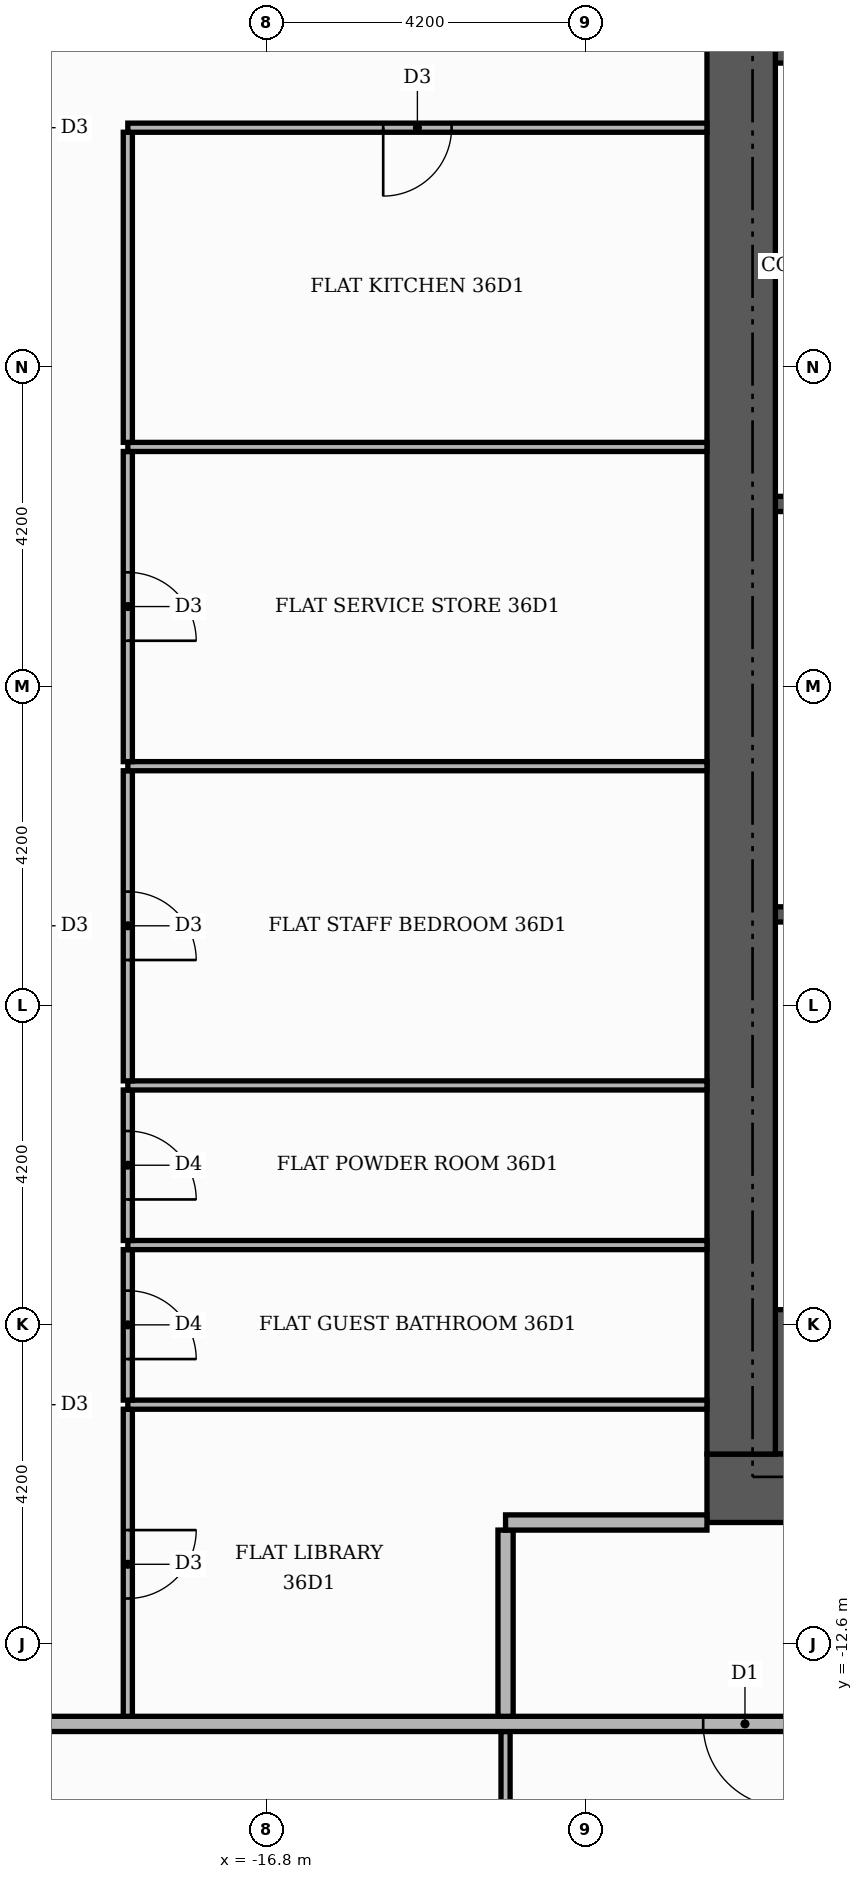
"""IFC4 building model, lengths in metres.
Left out: names, types, materials, properties, quantities, classifications, styles, units other than length and angle.
Written with IfcOpenShell. Run it as: python <this file> out.ifc"""

import sys

from ifc_helpers import new_model, si_unit, direction, frame, frame_2d, origin, place, context, subcontext, project, spatial, rectangle, extrude, element, fill, save


model = new_model("IFC4")
c1 = context("Model", 3, precision=1e-05, world=origin(), true_north=direction((0.0, 1.0)))
c2 = subcontext(c1, "Body", "Model", "MODEL_VIEW")
j1 = project(units=[si_unit("LENGTHUNIT", "METRE"), si_unit("PLANEANGLEUNIT", "RADIAN")], contexts=[c1])
p1 = place(None, origin())
s1 = spatial("IfcSite", under=j1, at=p1, CompositionType="ELEMENT")
p2 = place(p1, origin())
s2 = spatial("IfcBuilding", under=s1, at=p2, CompositionType="ELEMENT")
p3 = place(p2, frame((0.0, 0.0, 153.3)))
s3 = spatial("IfcBuildingStorey", under=s2, at=p3, CompositionType="ELEMENT", Elevation=153.3)
for number, where, z_axis, x_axis in (
    (1, (-10.1, -9.15, 0.0), (0.0, 0.0, 1.0), (1.0, 0.0, 0.0)),
    (2, (-10.1, 9.15, 0.0), (0.0, 0.0, 1.0), (1.0, 0.0, 0.0)),
):
    element("IfcWall", number, at=place(p3, frame(where, z_axis=z_axis, x_axis=x_axis)), inside=s3, PredefinedType="SHEAR", context=c2, shape_type="SweptSolid", body=[
        extrude(rectangle(XDim=4.6, YDim=1.9, at=frame_2d((2.3, 0.0))), origin(), (0.0, 0.0, 1.0), 3.48),
    ])
for number, where, z_axis, x_axis in (
    (3, (-10.1, -3.0, 0.0), (0.0, 0.0, 1.0), (1.0, 0.0, 0.0)),
    (4, (-10.1, 2.4, 0.0), (0.0, 0.0, 1.0), (1.0, 0.0, 0.0)),
):
    element("IfcWall", number, at=place(p3, frame(where, z_axis=z_axis, x_axis=x_axis)), inside=s3, PredefinedType="SHEAR", context=c2, shape_type="SweptSolid", body=[
        extrude(rectangle(XDim=0.9, YDim=0.2, at=frame_2d((0.45, 0.0))), origin(), (0.0, 0.0, 1.0), 3.48),
    ])
p4 = place(p3, frame((-11.0, -10.55, 0.0), z_axis=(0.0, 0.0, 1.0), x_axis=(1.0, 0.0, 0.0)))
e5 = element("IfcWall", 5, at=p4, inside=s3, PredefinedType="SHEAR", context=c2, shape_type="SweptSolid", body=[
    extrude(rectangle(XDim=22.0, YDim=0.9, at=frame_2d((11.0, 0.0))), origin(), (0.0, 0.0, 1.0), 3.48),
])
p5 = place(p4, frame((7.4, 0.0, 0.0)))
e6 = element("IfcOpeningElement", 6, at=p5, cuts=e5, PredefinedType="OPENING", context=c2, shape_type="SweptSolid", body=[
    extrude(rectangle(XDim=1.8, YDim=2.2, at=frame_2d((0.9, 1.1))), frame((0.0, 0.46, 0.0), z_axis=(0.0, -1.0, 0.0), x_axis=(1.0, 0.0, 0.0)), (0.0, 0.0, 1.0), 0.92),
])
p6 = place(p3, frame((-10.55, -10.1, 0.0), z_axis=(0.0, 0.0, 1.0), x_axis=(0.0, 1.0, 0.0)))
e7 = element("IfcWall", 7, at=p6, inside=s3, PredefinedType="SHEAR", context=c2, shape_type="SweptSolid", body=[
    extrude(rectangle(XDim=20.2, YDim=0.9, at=frame_2d((10.1, 0.0))), origin(), (0.0, 0.0, 1.0), 3.48),
])
p7 = place(p3, frame((-13.65, -20.66, 0.0), z_axis=(0.0, 0.0, 1.0), x_axis=(0.0, 1.0, 0.0)))
e8 = element("IfcWall", 8, at=p7, inside=s3, PredefinedType="PARTITIONING", context=c2, shape_type="SweptSolid", body=[
    extrude(rectangle(XDim=6.91, YDim=0.12, at=frame_2d((3.455, 0.0))), origin(), (0.0, 0.0, 1.0), 3.48),
])
p8 = place(p7, frame((3.025, 0.0, 0.0)))
e9 = element("IfcOpeningElement", 9, at=p8, cuts=e8, PredefinedType="OPENING", context=c2, shape_type="SweptSolid", body=[
    extrude(rectangle(XDim=0.9, YDim=2.1, at=frame_2d((0.45, 1.05))), frame((0.0, 0.07, 0.0), z_axis=(0.0, -1.0, 0.0), x_axis=(1.0, 0.0, 0.0)), (0.0, 0.0, 1.0), 0.14),
])
p9 = place(p3, frame((-25.42, -13.65, 0.0), z_axis=(0.0, 0.0, 1.0), x_axis=(1.0, 0.0, 0.0)))
e10 = element("IfcWall", 10, at=p9, inside=s3, PredefinedType="PARTITIONING", context=c2, shape_type="SweptSolid", body=[
    extrude(rectangle(XDim=39.07, YDim=0.2, at=frame_2d((19.535, 0.0))), origin(), (0.0, 0.0, 1.0), 3.48),
])
p10 = place(p9, frame((14.37, 0.0, 0.0)))
e11 = element("IfcOpeningElement", 11, at=p10, cuts=e10, PredefinedType="OPENING", context=c2, shape_type="SweptSolid", body=[
    extrude(rectangle(XDim=1.1, YDim=2.4, at=frame_2d((0.55, 1.2))), frame((0.0, 0.11, 0.0), z_axis=(0.0, -1.0, 0.0), x_axis=(1.0, 0.0, 0.0)), (0.0, 0.0, 1.0), 0.22),
])
p11 = place(p3, frame((-18.62, -13.55, 0.0), z_axis=(0.0, 0.0, 1.0), x_axis=(0.0, 1.0, 0.0)))
e12 = element("IfcWall", 12, at=p11, inside=s3, PredefinedType="PARTITIONING", context=c2, shape_type="SweptSolid", body=[
    extrude(rectangle(XDim=4.04, YDim=0.12, at=frame_2d((2.02, 0.0))), origin(), (0.0, 0.0, 1.0), 3.48),
])
p12 = place(p11, frame((1.55, 0.0, 0.0)))
e13 = element("IfcOpeningElement", 13, at=p12, cuts=e12, PredefinedType="OPENING", context=c2, shape_type="SweptSolid", body=[
    extrude(rectangle(XDim=0.9, YDim=2.1, at=frame_2d((0.45, 1.05))), frame((0.0, 0.07, 0.0), z_axis=(0.0, -1.0, 0.0), x_axis=(1.0, 0.0, 0.0)), (0.0, 0.0, 1.0), 0.14),
])
p13 = place(p3, frame((-13.65, -13.55, 0.0), z_axis=(0.0, 0.0, 1.0), x_axis=(0.0, 1.0, 0.0)))
e14 = element("IfcWall", 14, at=p13, inside=s3, PredefinedType="PARTITIONING", context=c2, shape_type="SweptSolid", body=[
    extrude(rectangle(XDim=2.45, YDim=0.2, at=frame_2d((1.225, 0.0))), origin(), (0.0, 0.0, 1.0), 3.48),
])
p14 = place(p3, frame((-13.65, -11.0, 0.0), z_axis=(0.0, 0.0, 1.0), x_axis=(1.0, 0.0, 0.0)))
e15 = element("IfcWall", 15, at=p14, inside=s3, PredefinedType="PARTITIONING", context=c2, shape_type="SweptSolid", body=[
    extrude(rectangle(XDim=2.65, YDim=0.2, at=frame_2d((1.325, 0.0))), origin(), (0.0, 0.0, 1.0), 3.48),
])
p15 = place(p3, frame((-18.62, -9.45, 0.0), z_axis=(0.0, 0.0, 1.0), x_axis=(1.0, 0.0, 0.0)))
e16 = element("IfcWall", 16, at=p15, inside=s3, PredefinedType="PARTITIONING", context=c2, shape_type="SweptSolid", body=[
    extrude(rectangle(XDim=7.62, YDim=0.12, at=frame_2d((3.81, 0.0))), origin(), (0.0, 0.0, 1.0), 3.48),
])
p16 = place(p3, frame((-18.62, -9.39, 0.0), z_axis=(0.0, 0.0, 1.0), x_axis=(0.0, 1.0, 0.0)))
e17 = element("IfcWall", 17, at=p16, inside=s3, PredefinedType="PARTITIONING", context=c2, shape_type="SweptSolid", body=[
    extrude(rectangle(XDim=1.98, YDim=0.12, at=frame_2d((0.99, 0.0))), origin(), (0.0, 0.0, 1.0), 3.48),
])
p17 = place(p16, frame((0.54, 0.0, 0.0)))
e18 = element("IfcOpeningElement", 18, at=p17, cuts=e17, PredefinedType="OPENING", context=c2, shape_type="SweptSolid", body=[
    extrude(rectangle(XDim=0.9, YDim=2.1, at=frame_2d((0.45, 1.05))), frame((0.0, 0.07, 0.0), z_axis=(0.0, -1.0, 0.0), x_axis=(1.0, 0.0, 0.0)), (0.0, 0.0, 1.0), 0.14),
])
p18 = place(p3, frame((-18.62, -7.35, 0.0), z_axis=(0.0, 0.0, 1.0), x_axis=(1.0, 0.0, 0.0)))
e19 = element("IfcWall", 19, at=p18, inside=s3, PredefinedType="PARTITIONING", context=c2, shape_type="SweptSolid", body=[
    extrude(rectangle(XDim=7.62, YDim=0.12, at=frame_2d((3.81, 0.0))), origin(), (0.0, 0.0, 1.0), 3.48),
])
p19 = place(p3, frame((-18.62, -7.29, 0.0), z_axis=(0.0, 0.0, 1.0), x_axis=(0.0, 1.0, 0.0)))
e20 = element("IfcWall", 20, at=p19, inside=s3, PredefinedType="PARTITIONING", context=c2, shape_type="SweptSolid", body=[
    extrude(rectangle(XDim=1.98, YDim=0.12, at=frame_2d((0.99, 0.0))), origin(), (0.0, 0.0, 1.0), 3.48),
])
p20 = place(p19, frame((0.54, 0.0, 0.0)))
e21 = element("IfcOpeningElement", 21, at=p20, cuts=e20, PredefinedType="OPENING", context=c2, shape_type="SweptSolid", body=[
    extrude(rectangle(XDim=0.9, YDim=2.1, at=frame_2d((0.45, 1.05))), frame((0.0, 0.07, 0.0), z_axis=(0.0, -1.0, 0.0), x_axis=(1.0, 0.0, 0.0)), (0.0, 0.0, 1.0), 0.14),
])
p21 = place(p3, frame((-18.62, -5.25, 0.0), z_axis=(0.0, 0.0, 1.0), x_axis=(1.0, 0.0, 0.0)))
e22 = element("IfcWall", 22, at=p21, inside=s3, PredefinedType="PARTITIONING", context=c2, shape_type="SweptSolid", body=[
    extrude(rectangle(XDim=7.62, YDim=0.12, at=frame_2d((3.81, 0.0))), origin(), (0.0, 0.0, 1.0), 3.48),
])
p22 = place(p3, frame((-18.62, -5.19, 0.0), z_axis=(0.0, 0.0, 1.0), x_axis=(0.0, 1.0, 0.0)))
e23 = element("IfcWall", 23, at=p22, inside=s3, PredefinedType="PARTITIONING", context=c2, shape_type="SweptSolid", body=[
    extrude(rectangle(XDim=4.08, YDim=0.12, at=frame_2d((2.04, 0.0))), origin(), (0.0, 0.0, 1.0), 3.48),
])
p23 = place(p22, frame((1.59, 0.0, 0.0)))
e24 = element("IfcOpeningElement", 24, at=p23, cuts=e23, PredefinedType="OPENING", context=c2, shape_type="SweptSolid", body=[
    extrude(rectangle(XDim=0.9, YDim=2.1, at=frame_2d((0.45, 1.05))), frame((0.0, 0.07, 0.0), z_axis=(0.0, -1.0, 0.0), x_axis=(1.0, 0.0, 0.0)), (0.0, 0.0, 1.0), 0.14),
])
p24 = place(p3, frame((-18.62, -1.05, 0.0), z_axis=(0.0, 0.0, 1.0), x_axis=(1.0, 0.0, 0.0)))
e25 = element("IfcWall", 25, at=p24, inside=s3, PredefinedType="PARTITIONING", context=c2, shape_type="SweptSolid", body=[
    extrude(rectangle(XDim=7.62, YDim=0.12, at=frame_2d((3.81, 0.0))), origin(), (0.0, 0.0, 1.0), 3.48),
])
p25 = place(p3, frame((-18.62, -0.99, 0.0), z_axis=(0.0, 0.0, 1.0), x_axis=(0.0, 1.0, 0.0)))
e26 = element("IfcWall", 26, at=p25, inside=s3, PredefinedType="PARTITIONING", context=c2, shape_type="SweptSolid", body=[
    extrude(rectangle(XDim=4.08, YDim=0.12, at=frame_2d((2.04, 0.0))), origin(), (0.0, 0.0, 1.0), 3.48),
])
p26 = place(p25, frame((1.59, 0.0, 0.0)))
e27 = element("IfcOpeningElement", 27, at=p26, cuts=e26, PredefinedType="OPENING", context=c2, shape_type="SweptSolid", body=[
    extrude(rectangle(XDim=0.9, YDim=2.1, at=frame_2d((0.45, 1.05))), frame((0.0, 0.07, 0.0), z_axis=(0.0, -1.0, 0.0), x_axis=(1.0, 0.0, 0.0)), (0.0, 0.0, 1.0), 0.14),
])
p27 = place(p3, frame((-18.62, 3.15, 0.0), z_axis=(0.0, 0.0, 1.0), x_axis=(1.0, 0.0, 0.0)))
e28 = element("IfcWall", 28, at=p27, inside=s3, PredefinedType="PARTITIONING", context=c2, shape_type="SweptSolid", body=[
    extrude(rectangle(XDim=7.62, YDim=0.12, at=frame_2d((3.81, 0.0))), origin(), (0.0, 0.0, 1.0), 3.48),
])
p28 = place(p3, frame((-18.62, 3.21, 0.0), z_axis=(0.0, 0.0, 1.0), x_axis=(0.0, 1.0, 0.0)))
e29 = element("IfcWall", 29, at=p28, inside=s3, PredefinedType="PARTITIONING", context=c2, shape_type="SweptSolid", body=[
    extrude(rectangle(XDim=4.08, YDim=0.12, at=frame_2d((2.04, 0.0))), origin(), (0.0, 0.0, 1.0), 3.48),
])
p29 = place(p3, frame((-18.62, 7.35, 0.0), z_axis=(0.0, 0.0, 1.0), x_axis=(1.0, 0.0, 0.0)))
e30 = element("IfcWall", 30, at=p29, inside=s3, PredefinedType="PARTITIONING", context=c2, shape_type="SweptSolid", body=[
    extrude(rectangle(XDim=7.62, YDim=0.12, at=frame_2d((3.81, 0.0))), origin(), (0.0, 0.0, 1.0), 3.48),
])
p30 = place(p29, frame((3.36, 0.0, 0.0)))
e31 = element("IfcOpeningElement", 31, at=p30, cuts=e30, PredefinedType="OPENING", context=c2, shape_type="SweptSolid", body=[
    extrude(rectangle(XDim=0.9, YDim=2.1, at=frame_2d((0.45, 1.05))), frame((0.0, 0.07, 0.0), z_axis=(0.0, -1.0, 0.0), x_axis=(1.0, 0.0, 0.0)), (0.0, 0.0, 1.0), 0.14),
])
p31 = place(p10, frame((1.1, 0.0, 0.0), z_axis=(0.0, 0.0, 1.0), x_axis=(-1.0, 0.0, 0.0)))
e32 = element("IfcDoor", 32, at=p31, inside=s3, OperationType="SINGLE_SWING_RIGHT", PredefinedType="DOOR", context=c2, shape_type="SweptSolid", body=[
    extrude(rectangle(XDim=1.1, YDim=2.4, at=frame_2d((0.55, 1.2))), frame((0.0, 0.025, 0.0), z_axis=(0.0, -1.0, 0.0), x_axis=(1.0, 0.0, 0.0)), (0.0, 0.0, 1.0), 0.05),
])
fill(e11, e32)
p32 = place(p30, frame((0.9, 0.0, 0.0), z_axis=(0.0, 0.0, 1.0), x_axis=(-1.0, 0.0, 0.0)))
e33 = element("IfcDoor", 33, at=p32, inside=s3, OperationType="SINGLE_SWING_LEFT", PredefinedType="DOOR", context=c2, shape_type="SweptSolid", body=[
    extrude(rectangle(XDim=0.9, YDim=2.1, at=frame_2d((0.45, 1.05))), frame((0.0, 0.025, 0.0), z_axis=(0.0, -1.0, 0.0), x_axis=(1.0, 0.0, 0.0)), (0.0, 0.0, 1.0), 0.05),
])
fill(e31, e33)
p33 = place(p26, frame((0.9, 0.0, 0.0), z_axis=(0.0, 0.0, 1.0), x_axis=(-1.0, 0.0, 0.0)))
e34 = element("IfcDoor", 34, at=p33, inside=s3, OperationType="SINGLE_SWING_LEFT", PredefinedType="DOOR", context=c2, shape_type="SweptSolid", body=[
    extrude(rectangle(XDim=0.9, YDim=2.1, at=frame_2d((0.45, 1.05))), frame((0.0, 0.025, 0.0), z_axis=(0.0, -1.0, 0.0), x_axis=(1.0, 0.0, 0.0)), (0.0, 0.0, 1.0), 0.05),
])
fill(e27, e34)
p34 = place(p23, frame((0.9, 0.0, 0.0), z_axis=(0.0, 0.0, 1.0), x_axis=(-1.0, 0.0, 0.0)))
e35 = element("IfcDoor", 35, at=p34, inside=s3, OperationType="SINGLE_SWING_LEFT", PredefinedType="DOOR", context=c2, shape_type="SweptSolid", body=[
    extrude(rectangle(XDim=0.9, YDim=2.1, at=frame_2d((0.45, 1.05))), frame((0.0, 0.025, 0.0), z_axis=(0.0, -1.0, 0.0), x_axis=(1.0, 0.0, 0.0)), (0.0, 0.0, 1.0), 0.05),
])
fill(e24, e35)
p35 = place(p20, frame((0.9, 0.0, 0.0), z_axis=(0.0, 0.0, 1.0), x_axis=(-1.0, 0.0, 0.0)))
e36 = element("IfcDoor", 36, at=p35, inside=s3, OperationType="SINGLE_SWING_LEFT", PredefinedType="DOOR", context=c2, shape_type="SweptSolid", body=[
    extrude(rectangle(XDim=0.9, YDim=2.1, at=frame_2d((0.45, 1.05))), frame((0.0, 0.025, 0.0), z_axis=(0.0, -1.0, 0.0), x_axis=(1.0, 0.0, 0.0)), (0.0, 0.0, 1.0), 0.05),
])
fill(e21, e36)
p36 = place(p17, frame((0.9, 0.0, 0.0), z_axis=(0.0, 0.0, 1.0), x_axis=(-1.0, 0.0, 0.0)))
e37 = element("IfcDoor", 37, at=p36, inside=s3, OperationType="SINGLE_SWING_LEFT", PredefinedType="DOOR", context=c2, shape_type="SweptSolid", body=[
    extrude(rectangle(XDim=0.9, YDim=2.1, at=frame_2d((0.45, 1.05))), frame((0.0, 0.025, 0.0), z_axis=(0.0, -1.0, 0.0), x_axis=(1.0, 0.0, 0.0)), (0.0, 0.0, 1.0), 0.05),
])
fill(e18, e37)
p37 = place(p12, frame((0.9, 0.0, 0.0), z_axis=(0.0, 0.0, 1.0), x_axis=(-1.0, 0.0, 0.0)))
e38 = element("IfcDoor", 38, at=p37, inside=s3, OperationType="SINGLE_SWING_RIGHT", PredefinedType="DOOR", context=c2, shape_type="SweptSolid", body=[
    extrude(rectangle(XDim=0.9, YDim=2.1, at=frame_2d((0.45, 1.05))), frame((0.0, 0.025, 0.0), z_axis=(0.0, -1.0, 0.0), x_axis=(1.0, 0.0, 0.0)), (0.0, 0.0, 1.0), 0.05),
])
fill(e13, e38)
save(model, sys.argv[1])
